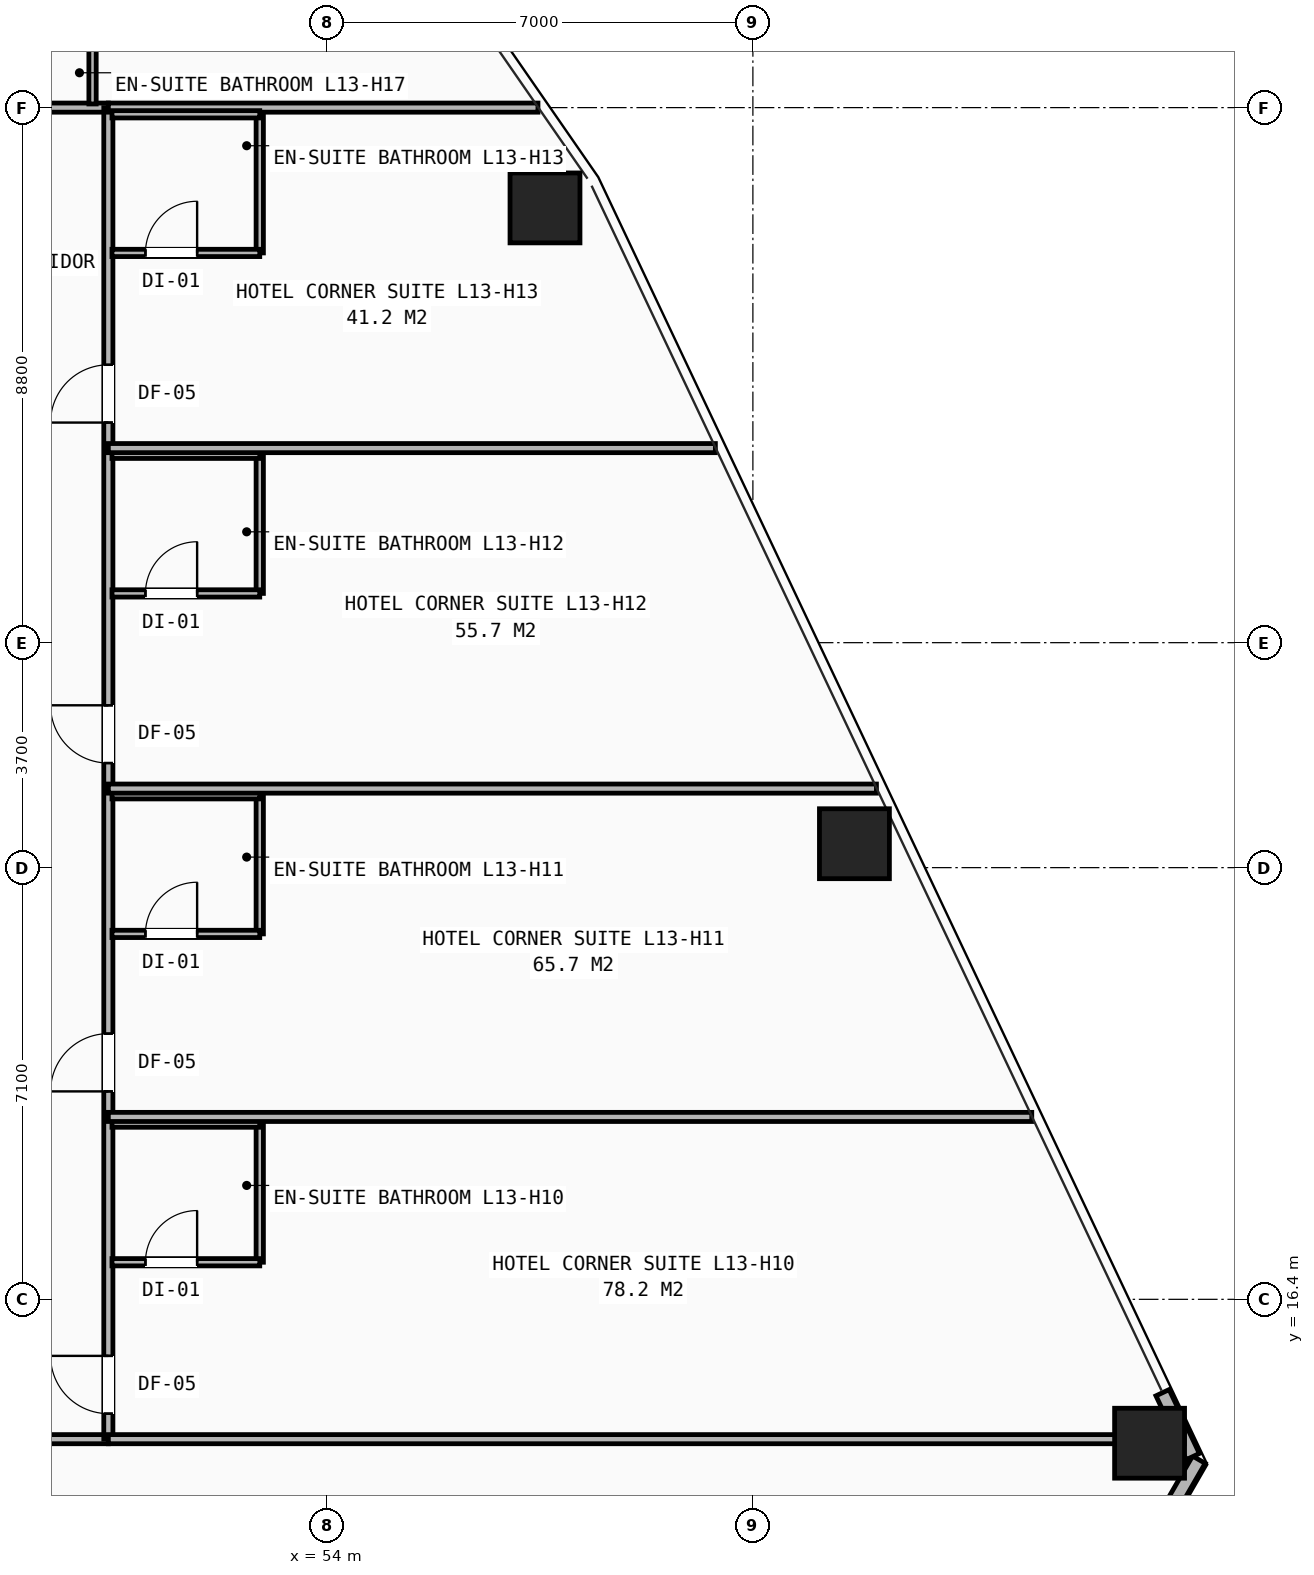
"""IFC4 building model, lengths in metres.
Left out: names, types, materials, properties, quantities, classifications, styles, units other than length and angle.
Written with IfcOpenShell. Run it as: python <this file> out.ifc"""

import sys

from ifc_helpers import new_model, si_unit, direction, frame, frame_2d, origin, origin_2d, place, context, subcontext, project, spatial, rectangle, hollow_rectangle, extrude, element, fill, save


model = new_model("IFC4")
c1 = context("Model", 3, precision=1e-05, world=origin(), true_north=direction((0.0, 1.0)))
c2 = subcontext(c1, "Body", "Model", "MODEL_VIEW")
j1 = project(units=[si_unit("LENGTHUNIT", "METRE"), si_unit("PLANEANGLEUNIT", "RADIAN")], contexts=[c1])
p1 = place(None, origin())
s1 = spatial("IfcSite", under=j1, at=p1, CompositionType="ELEMENT")
p2 = place(p1, origin())
s2 = spatial("IfcBuilding", under=s1, at=p2, CompositionType="ELEMENT")
p3 = place(p2, frame((0.0, 0.0, 49.6)))
s3 = spatial("IfcBuildingStorey", under=s2, at=p3, CompositionType="ELEMENT", Elevation=49.6)
for number, where, z_axis, x_axis in (
    (1, (67.524, 14.033, 0.0), (0.0, 0.0, 1.0), (1.0, 0.0, 0.0)),
    (2, (62.67, 23.893, 0.0), (0.0, 0.0, 1.0), (1.0, 0.0, 0.0)),
    (3, (57.581, 34.35, 0.0), (0.0, 0.0, 1.0), (1.0, 0.0, 0.0)),
):
    element("IfcColumn", number, at=place(p3, frame(where, z_axis=z_axis, x_axis=x_axis)), inside=s3, PredefinedType="COLUMN", context=c2, shape_type="SweptSolid", body=[
        extrude(hollow_rectangle(XDim=1.15, YDim=1.15, WallThickness=0.075, at=origin_2d()), origin(), (0.0, 0.0, 1.0), 3.2),
    ])
p4 = place(p3, frame((68.335, 13.763, 0.0), z_axis=(0.0, 0.0, 1.0), x_axis=(-0.50000197177, -0.86602426538, 0.0)))
e4 = element("IfcWall", 4, at=p4, inside=s3, PredefinedType="SHEAR", context=c2, shape_type="SweptSolid", body=[
    extrude(rectangle(XDim=10.257, YDim=0.24, at=frame_2d((5.129, 0.0))), origin(), (0.0, 0.0, 1.0), 2.263),
])
p5 = place(p3, frame((68.235, 13.813, 0.0), z_axis=(0.0, 0.0, 1.0), x_axis=(-0.42778841273, 0.903878904463, 0.0)))
e5 = element("IfcWall", 5, at=p5, inside=s3, PredefinedType="SHEAR", context=c2, shape_type="SweptSolid", body=[
    extrude(rectangle(XDim=1.163, YDim=0.24, at=frame_2d((0.581, 0.0))), origin(), (0.0, 0.0, 1.0), 2.263),
])
p6 = place(p3, frame((29.6, 14.1, 0.0), z_axis=(0.0, 0.0, 1.0), x_axis=(1.0, 0.0, 0.0)))
e6 = element("IfcWall", 6, at=p6, inside=s3, PredefinedType="PARTITIONING", context=c2, shape_type="SweptSolid", body=[
    extrude(rectangle(XDim=20.8, YDim=0.15, at=frame_2d((10.4, 0.0))), origin(), (0.0, 0.0, 1.0), 2.431),
])
p7 = place(p6, frame((0.57, 0.0, 0.0)))
e7 = element("IfcOpeningElement", 7, at=p7, cuts=e6, PredefinedType="OPENING", context=c2, shape_type="SweptSolid", body=[
    extrude(rectangle(XDim=0.95, YDim=2.1, at=frame_2d((0.475, 1.05))), frame((0.0, 0.085, 0.0), z_axis=(0.0, -1.0, 0.0), x_axis=(1.0, 0.0, 0.0)), (0.0, 0.0, 1.0), 0.17),
])
p8 = place(p6, frame((4.22, 0.0, 0.0)))
e8 = element("IfcOpeningElement", 8, at=p8, cuts=e6, PredefinedType="OPENING", context=c2, shape_type="SweptSolid", body=[
    extrude(rectangle(XDim=0.95, YDim=2.1, at=frame_2d((0.475, 1.05))), frame((0.0, 0.085, 0.0), z_axis=(0.0, -1.0, 0.0), x_axis=(1.0, 0.0, 0.0)), (0.0, 0.0, 1.0), 0.17),
])
p9 = place(p6, frame((8.42, 0.0, 0.0)))
e9 = element("IfcOpeningElement", 9, at=p9, cuts=e6, PredefinedType="OPENING", context=c2, shape_type="SweptSolid", body=[
    extrude(rectangle(XDim=0.95, YDim=2.1, at=frame_2d((0.475, 1.05))), frame((0.0, 0.085, 0.0), z_axis=(0.0, -1.0, 0.0), x_axis=(1.0, 0.0, 0.0)), (0.0, 0.0, 1.0), 0.17),
])
p10 = place(p6, frame((12.62, 0.0, 0.0)))
e10 = element("IfcOpeningElement", 10, at=p10, cuts=e6, PredefinedType="OPENING", context=c2, shape_type="SweptSolid", body=[
    extrude(rectangle(XDim=0.95, YDim=2.1, at=frame_2d((0.475, 1.05))), frame((0.0, 0.085, 0.0), z_axis=(0.0, -1.0, 0.0), x_axis=(1.0, 0.0, 0.0)), (0.0, 0.0, 1.0), 0.17),
])
p11 = place(p6, frame((17.02, 0.0, 0.0)))
e11 = element("IfcOpeningElement", 11, at=p11, cuts=e6, PredefinedType="OPENING", context=c2, shape_type="SweptSolid", body=[
    extrude(rectangle(XDim=0.95, YDim=2.1, at=frame_2d((0.475, 1.05))), frame((0.0, 0.085, 0.0), z_axis=(0.0, -1.0, 0.0), x_axis=(1.0, 0.0, 0.0)), (0.0, 0.0, 1.0), 0.17),
])
p12 = place(p3, frame((41.275, 36.0, 0.0), z_axis=(0.0, 0.0, 1.0), x_axis=(1.0, 0.0, 0.0)))
e12 = element("IfcWall", 12, at=p12, inside=s3, PredefinedType="PARTITIONING", context=c2, shape_type="SweptSolid", body=[
    extrude(rectangle(XDim=9.125, YDim=0.15, at=frame_2d((4.562, 0.0))), origin(), (0.0, 0.0, 1.0), 2.513),
])
p13 = place(p12, frame((0.2, 0.0, 0.0)))
e13 = element("IfcOpeningElement", 13, at=p13, cuts=e12, PredefinedType="OPENING", context=c2, shape_type="SweptSolid", body=[
    extrude(rectangle(XDim=0.95, YDim=2.1, at=frame_2d((0.475, 1.05))), frame((0.0, 0.085, 0.0), z_axis=(0.0, -1.0, 0.0), x_axis=(1.0, 0.0, 0.0)), (0.0, 0.0, 1.0), 0.17),
])
p14 = place(p12, frame((4.345, 0.0, 0.0)))
e14 = element("IfcOpeningElement", 14, at=p14, cuts=e12, PredefinedType="OPENING", context=c2, shape_type="SweptSolid", body=[
    extrude(rectangle(XDim=0.95, YDim=2.1, at=frame_2d((0.475, 1.05))), frame((0.0, 0.085, 0.0), z_axis=(0.0, -1.0, 0.0), x_axis=(1.0, 0.0, 0.0)), (0.0, 0.0, 1.0), 0.17),
])
p15 = place(p3, frame((50.4, 14.1, 0.0), z_axis=(0.0, 0.0, 1.0), x_axis=(0.0, 1.0, 0.0)))
e15 = element("IfcWall", 15, at=p15, inside=s3, PredefinedType="PARTITIONING", context=c2, shape_type="SweptSolid", body=[
    extrude(rectangle(XDim=21.9, YDim=0.15, at=frame_2d((10.95, 0.0))), origin(), (0.0, 0.0, 1.0), 2.431),
])
p16 = place(p15, frame((0.42, 0.0, 0.0)))
e16 = element("IfcOpeningElement", 16, at=p16, cuts=e15, PredefinedType="OPENING", context=c2, shape_type="SweptSolid", body=[
    extrude(rectangle(XDim=0.95, YDim=2.1, at=frame_2d((0.475, 1.05))), frame((0.0, 0.085, 0.0), z_axis=(0.0, -1.0, 0.0), x_axis=(1.0, 0.0, 0.0)), (0.0, 0.0, 1.0), 0.17),
])
p17 = place(p15, frame((5.72, 0.0, 0.0)))
e17 = element("IfcOpeningElement", 17, at=p17, cuts=e15, PredefinedType="OPENING", context=c2, shape_type="SweptSolid", body=[
    extrude(rectangle(XDim=0.95, YDim=2.1, at=frame_2d((0.475, 1.05))), frame((0.0, 0.085, 0.0), z_axis=(0.0, -1.0, 0.0), x_axis=(1.0, 0.0, 0.0)), (0.0, 0.0, 1.0), 0.17),
])
p18 = place(p15, frame((11.12, 0.0, 0.0)))
e18 = element("IfcOpeningElement", 18, at=p18, cuts=e15, PredefinedType="OPENING", context=c2, shape_type="SweptSolid", body=[
    extrude(rectangle(XDim=0.95, YDim=2.1, at=frame_2d((0.475, 1.05))), frame((0.0, 0.085, 0.0), z_axis=(0.0, -1.0, 0.0), x_axis=(1.0, 0.0, 0.0)), (0.0, 0.0, 1.0), 0.17),
])
p19 = place(p15, frame((16.72, 0.0, 0.0)))
e19 = element("IfcOpeningElement", 19, at=p19, cuts=e15, PredefinedType="OPENING", context=c2, shape_type="SweptSolid", body=[
    extrude(rectangle(XDim=0.95, YDim=2.1, at=frame_2d((0.475, 1.05))), frame((0.0, 0.085, 0.0), z_axis=(0.0, -1.0, 0.0), x_axis=(1.0, 0.0, 0.0)), (0.0, 0.0, 1.0), 0.17),
])
p20 = place(p3, frame((50.4, 14.1, 0.0), z_axis=(0.0, 0.0, 1.0), x_axis=(1.0, 0.0, 0.0)))
e20 = element("IfcWall", 20, at=p20, inside=s3, PredefinedType="PARTITIONING", context=c2, shape_type="SweptSolid", body=[
    extrude(rectangle(XDim=17.694, YDim=0.15, at=frame_2d((8.847, 0.0))), origin(), (0.0, 0.0, 1.0), 2.268),
])
p21 = place(p3, frame((50.4, 36.0, 0.0), z_axis=(0.0, 0.0, 1.0), x_axis=(1.0, 0.0, 0.0)))
e21 = element("IfcWall", 21, at=p21, inside=s3, PredefinedType="PARTITIONING", context=c2, shape_type="SweptSolid", body=[
    extrude(rectangle(XDim=7.065, YDim=0.15, at=frame_2d((3.533, 0.0))), origin(), (0.0, 0.0, 1.0), 2.268),
])
p22 = place(p3, frame((52.89, 17.01, 0.0), z_axis=(0.0, 0.0, 1.0), x_axis=(0.0, 1.0, 0.0)))
e22 = element("IfcWall", 22, at=p22, inside=s3, PredefinedType="PARTITIONING", context=c2, shape_type="SweptSolid", body=[
    extrude(rectangle(XDim=2.28, YDim=0.12, at=frame_2d((1.14, 0.0))), origin(), (0.0, 0.0, 1.0), 2.98),
])
p23 = place(p3, frame((50.46, 17.01, 0.0), z_axis=(0.0, 0.0, 1.0), x_axis=(1.0, 0.0, 0.0)))
e23 = element("IfcWall", 23, at=p23, inside=s3, PredefinedType="PARTITIONING", context=c2, shape_type="SweptSolid", body=[
    extrude(rectangle(XDim=2.43, YDim=0.12, at=frame_2d((1.215, 0.0))), origin(), (0.0, 0.0, 1.0), 2.98),
])
p24 = place(p23, frame((0.55, 0.0, 0.0)))
e24 = element("IfcOpeningElement", 24, at=p24, cuts=e23, PredefinedType="OPENING", context=c2, shape_type="SweptSolid", body=[
    extrude(rectangle(XDim=0.85, YDim=2.05, at=frame_2d((0.425, 1.025))), frame((0.0, 0.07, 0.0), z_axis=(0.0, -1.0, 0.0), x_axis=(1.0, 0.0, 0.0)), (0.0, 0.0, 1.0), 0.14),
])
p25 = place(p3, frame((50.46, 19.29, 0.0), z_axis=(0.0, 0.0, 1.0), x_axis=(1.0, 0.0, 0.0)))
e25 = element("IfcWall", 25, at=p25, inside=s3, PredefinedType="PARTITIONING", context=c2, shape_type="SweptSolid", body=[
    extrude(rectangle(XDim=2.43, YDim=0.12, at=frame_2d((1.215, 0.0))), origin(), (0.0, 0.0, 1.0), 2.98),
])
p26 = place(p3, frame((50.4, 19.4, 0.0), z_axis=(0.0, 0.0, 1.0), x_axis=(1.0, 0.0, 0.0)))
e26 = element("IfcWall", 26, at=p26, inside=s3, PredefinedType="PARTITIONING", context=c2, shape_type="SweptSolid", body=[
    extrude(rectangle(XDim=15.186, YDim=0.15, at=frame_2d((7.593, 0.0))), origin(), (0.0, 0.0, 1.0), 2.268),
])
p27 = place(p3, frame((52.89, 22.41, 0.0), z_axis=(0.0, 0.0, 1.0), x_axis=(0.0, 1.0, 0.0)))
e27 = element("IfcWall", 27, at=p27, inside=s3, PredefinedType="PARTITIONING", context=c2, shape_type="SweptSolid", body=[
    extrude(rectangle(XDim=2.28, YDim=0.12, at=frame_2d((1.14, 0.0))), origin(), (0.0, 0.0, 1.0), 2.98),
])
p28 = place(p3, frame((50.46, 22.41, 0.0), z_axis=(0.0, 0.0, 1.0), x_axis=(1.0, 0.0, 0.0)))
e28 = element("IfcWall", 28, at=p28, inside=s3, PredefinedType="PARTITIONING", context=c2, shape_type="SweptSolid", body=[
    extrude(rectangle(XDim=2.43, YDim=0.12, at=frame_2d((1.215, 0.0))), origin(), (0.0, 0.0, 1.0), 2.98),
])
p29 = place(p28, frame((0.55, 0.0, 0.0)))
e29 = element("IfcOpeningElement", 29, at=p29, cuts=e28, PredefinedType="OPENING", context=c2, shape_type="SweptSolid", body=[
    extrude(rectangle(XDim=0.85, YDim=2.05, at=frame_2d((0.425, 1.025))), frame((0.0, 0.07, 0.0), z_axis=(0.0, -1.0, 0.0), x_axis=(1.0, 0.0, 0.0)), (0.0, 0.0, 1.0), 0.14),
])
p30 = place(p3, frame((50.46, 24.69, 0.0), z_axis=(0.0, 0.0, 1.0), x_axis=(1.0, 0.0, 0.0)))
e30 = element("IfcWall", 30, at=p30, inside=s3, PredefinedType="PARTITIONING", context=c2, shape_type="SweptSolid", body=[
    extrude(rectangle(XDim=2.43, YDim=0.12, at=frame_2d((1.215, 0.0))), origin(), (0.0, 0.0, 1.0), 2.98),
])
p31 = place(p3, frame((50.4, 24.8, 0.0), z_axis=(0.0, 0.0, 1.0), x_axis=(1.0, 0.0, 0.0)))
e31 = element("IfcWall", 31, at=p31, inside=s3, PredefinedType="PARTITIONING", context=c2, shape_type="SweptSolid", body=[
    extrude(rectangle(XDim=12.632, YDim=0.15, at=frame_2d((6.316, 0.0))), origin(), (0.0, 0.0, 1.0), 2.268),
])
p32 = place(p3, frame((52.89, 28.01, 0.0), z_axis=(0.0, 0.0, 1.0), x_axis=(0.0, 1.0, 0.0)))
e32 = element("IfcWall", 32, at=p32, inside=s3, PredefinedType="PARTITIONING", context=c2, shape_type="SweptSolid", body=[
    extrude(rectangle(XDim=2.28, YDim=0.12, at=frame_2d((1.14, 0.0))), origin(), (0.0, 0.0, 1.0), 2.98),
])
p33 = place(p3, frame((50.46, 28.01, 0.0), z_axis=(0.0, 0.0, 1.0), x_axis=(1.0, 0.0, 0.0)))
e33 = element("IfcWall", 33, at=p33, inside=s3, PredefinedType="PARTITIONING", context=c2, shape_type="SweptSolid", body=[
    extrude(rectangle(XDim=2.43, YDim=0.12, at=frame_2d((1.215, 0.0))), origin(), (0.0, 0.0, 1.0), 2.98),
])
p34 = place(p33, frame((0.55, 0.0, 0.0)))
e34 = element("IfcOpeningElement", 34, at=p34, cuts=e33, PredefinedType="OPENING", context=c2, shape_type="SweptSolid", body=[
    extrude(rectangle(XDim=0.85, YDim=2.05, at=frame_2d((0.425, 1.025))), frame((0.0, 0.07, 0.0), z_axis=(0.0, -1.0, 0.0), x_axis=(1.0, 0.0, 0.0)), (0.0, 0.0, 1.0), 0.14),
])
p35 = place(p3, frame((50.46, 30.29, 0.0), z_axis=(0.0, 0.0, 1.0), x_axis=(1.0, 0.0, 0.0)))
e35 = element("IfcWall", 35, at=p35, inside=s3, PredefinedType="PARTITIONING", context=c2, shape_type="SweptSolid", body=[
    extrude(rectangle(XDim=2.43, YDim=0.12, at=frame_2d((1.215, 0.0))), origin(), (0.0, 0.0, 1.0), 2.98),
])
p36 = place(p3, frame((50.4, 30.4, 0.0), z_axis=(0.0, 0.0, 1.0), x_axis=(1.0, 0.0, 0.0)))
e36 = element("IfcWall", 36, at=p36, inside=s3, PredefinedType="PARTITIONING", context=c2, shape_type="SweptSolid", body=[
    extrude(rectangle(XDim=9.983, YDim=0.15, at=frame_2d((4.992, 0.0))), origin(), (0.0, 0.0, 1.0), 2.268),
])
p37 = place(p3, frame((52.89, 33.61, 0.0), z_axis=(0.0, 0.0, 1.0), x_axis=(0.0, 1.0, 0.0)))
e37 = element("IfcWall", 37, at=p37, inside=s3, PredefinedType="PARTITIONING", context=c2, shape_type="SweptSolid", body=[
    extrude(rectangle(XDim=2.28, YDim=0.12, at=frame_2d((1.14, 0.0))), origin(), (0.0, 0.0, 1.0), 2.98),
])
p38 = place(p3, frame((50.46, 33.61, 0.0), z_axis=(0.0, 0.0, 1.0), x_axis=(1.0, 0.0, 0.0)))
e38 = element("IfcWall", 38, at=p38, inside=s3, PredefinedType="PARTITIONING", context=c2, shape_type="SweptSolid", body=[
    extrude(rectangle(XDim=2.43, YDim=0.12, at=frame_2d((1.215, 0.0))), origin(), (0.0, 0.0, 1.0), 2.513),
])
p39 = place(p38, frame((0.55, 0.0, 0.0)))
e39 = element("IfcOpeningElement", 39, at=p39, cuts=e38, PredefinedType="OPENING", context=c2, shape_type="SweptSolid", body=[
    extrude(rectangle(XDim=0.85, YDim=2.05, at=frame_2d((0.425, 1.025))), frame((0.0, 0.07, 0.0), z_axis=(0.0, -1.0, 0.0), x_axis=(1.0, 0.0, 0.0)), (0.0, 0.0, 1.0), 0.14),
])
for number, where, z_axis, x_axis in (
    (40, (50.46, 35.89, 0.0), (0.0, 0.0, 1.0), (1.0, 0.0, 0.0)),
    (41, (50.14, 36.06, 0.0), (0.0, 0.0, 1.0), (0.0, 1.0, 0.0)),
):
    element("IfcWall", number, at=place(p3, frame(where, z_axis=z_axis, x_axis=x_axis)), inside=s3, PredefinedType="PARTITIONING", context=c2, shape_type="SweptSolid", body=[
        extrude(rectangle(XDim=2.43, YDim=0.12, at=frame_2d((1.215, 0.0))), origin(), (0.0, 0.0, 1.0), 2.513),
    ])
p40 = place(p16, origin())
e42 = element("IfcDoor", 42, at=p40, inside=s3, OperationType="SINGLE_SWING_RIGHT", PredefinedType="DOOR", context=c2, shape_type="SweptSolid", body=[
    extrude(rectangle(XDim=0.95, YDim=2.1, at=frame_2d((0.475, 1.05))), frame((0.0, 0.025, 0.0), z_axis=(0.0, -1.0, 0.0), x_axis=(1.0, 0.0, 0.0)), (0.0, 0.0, 1.0), 0.05),
])
fill(e16, e42)
p41 = place(p24, origin())
e43 = element("IfcDoor", 43, at=p41, inside=s3, OperationType="SINGLE_SWING_RIGHT", PredefinedType="DOOR", context=c2, shape_type="SweptSolid", body=[
    extrude(rectangle(XDim=0.85, YDim=2.05, at=frame_2d((0.425, 1.025))), frame((0.0, 0.025, 0.0), z_axis=(0.0, -1.0, 0.0), x_axis=(1.0, 0.0, 0.0)), (0.0, 0.0, 1.0), 0.05),
])
fill(e24, e43)
p42 = place(p17, origin())
e44 = element("IfcDoor", 44, at=p42, inside=s3, OperationType="SINGLE_SWING_LEFT", PredefinedType="DOOR", context=c2, shape_type="SweptSolid", body=[
    extrude(rectangle(XDim=0.95, YDim=2.1, at=frame_2d((0.475, 1.05))), frame((0.0, 0.025, 0.0), z_axis=(0.0, -1.0, 0.0), x_axis=(1.0, 0.0, 0.0)), (0.0, 0.0, 1.0), 0.05),
])
fill(e17, e44)
p43 = place(p29, origin())
e45 = element("IfcDoor", 45, at=p43, inside=s3, OperationType="SINGLE_SWING_RIGHT", PredefinedType="DOOR", context=c2, shape_type="SweptSolid", body=[
    extrude(rectangle(XDim=0.85, YDim=2.05, at=frame_2d((0.425, 1.025))), frame((0.0, 0.025, 0.0), z_axis=(0.0, -1.0, 0.0), x_axis=(1.0, 0.0, 0.0)), (0.0, 0.0, 1.0), 0.05),
])
fill(e29, e45)
p44 = place(p18, origin())
e46 = element("IfcDoor", 46, at=p44, inside=s3, OperationType="SINGLE_SWING_RIGHT", PredefinedType="DOOR", context=c2, shape_type="SweptSolid", body=[
    extrude(rectangle(XDim=0.95, YDim=2.1, at=frame_2d((0.475, 1.05))), frame((0.0, 0.025, 0.0), z_axis=(0.0, -1.0, 0.0), x_axis=(1.0, 0.0, 0.0)), (0.0, 0.0, 1.0), 0.05),
])
fill(e18, e46)
p45 = place(p34, origin())
e47 = element("IfcDoor", 47, at=p45, inside=s3, OperationType="SINGLE_SWING_RIGHT", PredefinedType="DOOR", context=c2, shape_type="SweptSolid", body=[
    extrude(rectangle(XDim=0.85, YDim=2.05, at=frame_2d((0.425, 1.025))), frame((0.0, 0.025, 0.0), z_axis=(0.0, -1.0, 0.0), x_axis=(1.0, 0.0, 0.0)), (0.0, 0.0, 1.0), 0.05),
])
fill(e34, e47)
p46 = place(p19, origin())
e48 = element("IfcDoor", 48, at=p46, inside=s3, OperationType="SINGLE_SWING_LEFT", PredefinedType="DOOR", context=c2, shape_type="SweptSolid", body=[
    extrude(rectangle(XDim=0.95, YDim=2.1, at=frame_2d((0.475, 1.05))), frame((0.0, 0.025, 0.0), z_axis=(0.0, -1.0, 0.0), x_axis=(1.0, 0.0, 0.0)), (0.0, 0.0, 1.0), 0.05),
])
fill(e19, e48)
p47 = place(p39, origin())
e49 = element("IfcDoor", 49, at=p47, inside=s3, OperationType="SINGLE_SWING_RIGHT", PredefinedType="DOOR", context=c2, shape_type="SweptSolid", body=[
    extrude(rectangle(XDim=0.85, YDim=2.05, at=frame_2d((0.425, 1.025))), frame((0.0, 0.025, 0.0), z_axis=(0.0, -1.0, 0.0), x_axis=(1.0, 0.0, 0.0)), (0.0, 0.0, 1.0), 0.05),
])
fill(e39, e49)
save(model, sys.argv[1])
